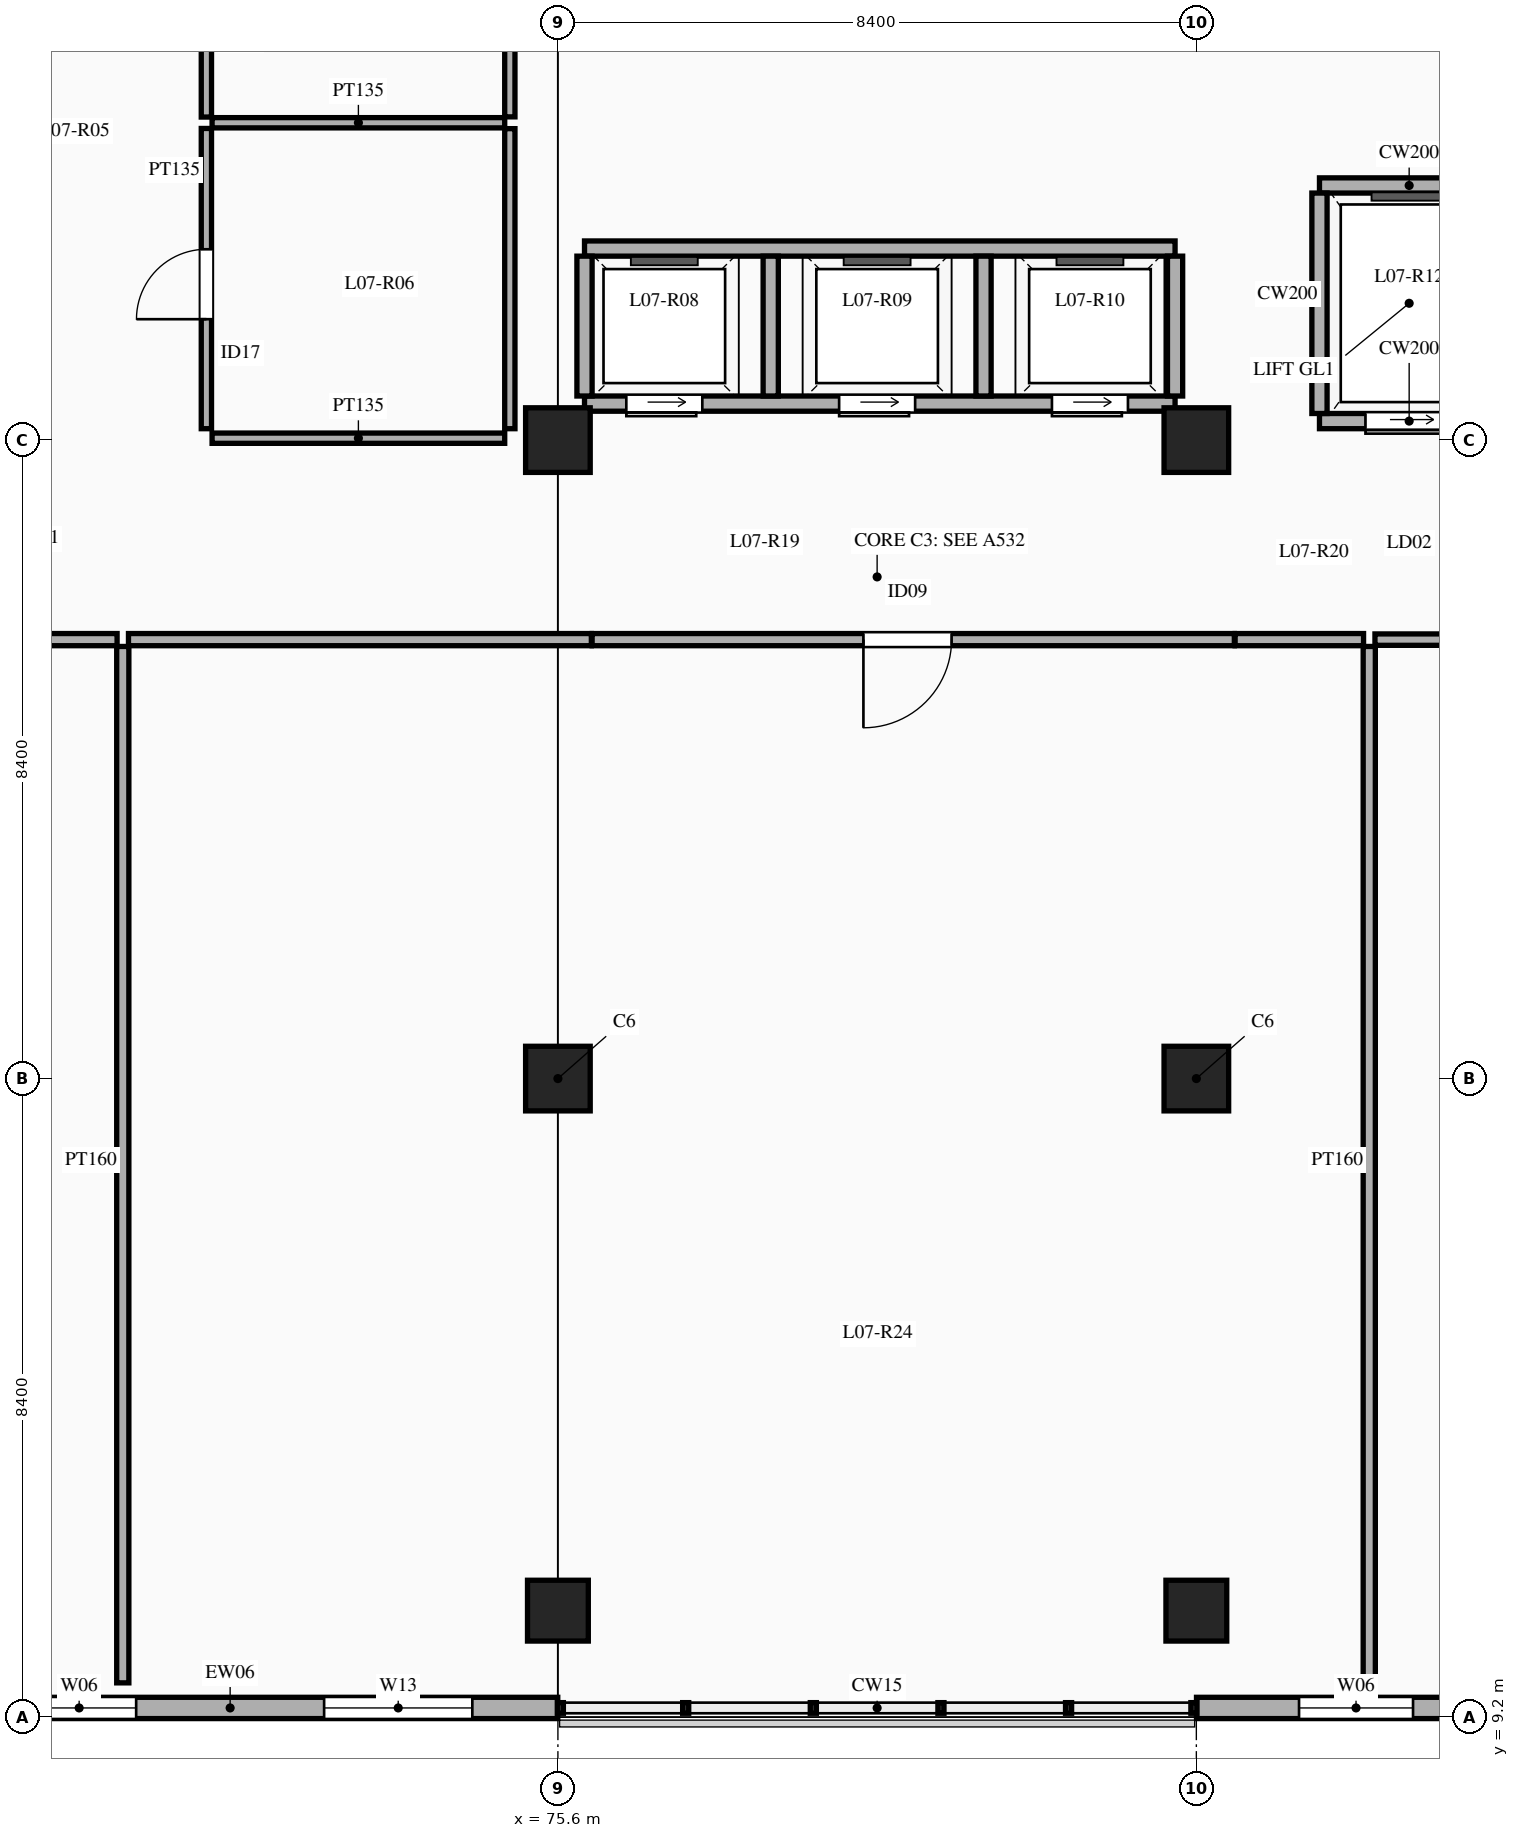
"""IFC4 building model, lengths in metres.
Left out: names, types, materials, properties, quantities, classifications, styles, units other than length and angle.
Written with IfcOpenShell. Run it as: python <this file> out.ifc"""

import sys

from ifc_helpers import new_model, si_unit, direction, frame, frame_2d, origin, origin_2d, place, context, subcontext, project, spatial, rectangle, extrude, element, fill, save


model = new_model("IFC4")
c1 = context("Model", 3, precision=1e-05, world=origin(), true_north=direction((0.0, 1.0)))
c2 = subcontext(c1, "Body", "Model", "MODEL_VIEW")
j1 = project(units=[si_unit("LENGTHUNIT", "METRE"), si_unit("PLANEANGLEUNIT", "RADIAN")], contexts=[c1])
p1 = place(None, origin())
s1 = spatial("IfcSite", under=j1, at=p1, CompositionType="ELEMENT")
p2 = place(p1, origin())
s2 = spatial("IfcBuilding", under=s1, at=p2, CompositionType="ELEMENT")
p3 = place(p2, frame((0.0, 0.0, 33.0)))
s3 = spatial("IfcBuildingStorey", under=s2, at=p3, CompositionType="ELEMENT", Elevation=33.0)
p4 = place(p3, frame((75.6, 10.6, 0.0), z_axis=(0.0, 0.0, 1.0), x_axis=(1.0, 0.0, 0.0)))
e1 = element("IfcColumn", 1, at=p4, inside=s3, PredefinedType="COLUMN", context=c2, shape_type="SweptSolid", body=[
    extrude(rectangle(XDim=0.8, YDim=0.8, at=origin_2d()), origin(), (0.0, 0.0, 1.0), 4.5),
])
for number, where, z_axis, x_axis in (
    (2, (75.6, 17.6, 0.0), (0.0, 0.0, 1.0), (1.0, 0.0, 0.0)),
    (3, (75.6, 26.0, 0.0), (0.0, 0.0, 1.0), (1.0, 0.0, 0.0)),
):
    element("IfcColumn", number, at=place(p3, frame(where, z_axis=z_axis, x_axis=x_axis)), inside=s3, PredefinedType="COLUMN", context=c2, shape_type="SweptSolid", body=[
        extrude(rectangle(XDim=0.85, YDim=0.85, at=origin_2d()), origin(), (0.0, 0.0, 1.0), 4.5),
    ])
p5 = place(p3, frame((84.0, 10.6, 0.0), z_axis=(0.0, 0.0, 1.0), x_axis=(1.0, 0.0, 0.0)))
e4 = element("IfcColumn", 4, at=p5, inside=s3, PredefinedType="COLUMN", context=c2, shape_type="SweptSolid", body=[
    extrude(rectangle(XDim=0.8, YDim=0.8, at=origin_2d()), origin(), (0.0, 0.0, 1.0), 4.5),
])
for number, where, z_axis, x_axis in (
    (5, (84.0, 17.6, 0.0), (0.0, 0.0, 1.0), (1.0, 0.0, 0.0)),
    (6, (84.0, 26.0, 0.0), (0.0, 0.0, 1.0), (1.0, 0.0, 0.0)),
):
    element("IfcColumn", number, at=place(p3, frame(where, z_axis=z_axis, x_axis=x_axis)), inside=s3, PredefinedType="COLUMN", context=c2, shape_type="SweptSolid", body=[
        extrude(rectangle(XDim=0.85, YDim=0.85, at=origin_2d()), origin(), (0.0, 0.0, 1.0), 4.5),
    ])
p6 = place(p3, frame((67.202, 9.32, 0.0), z_axis=(0.0, 0.0, 1.0), x_axis=(1.0, 0.0, 0.0)))
e7 = element("IfcWall", 7, at=p6, inside=s3, PredefinedType="ELEMENTEDWALL", context=c2, shape_type="SweptSolid", body=[
    extrude(rectangle(XDim=8.396, YDim=0.28, at=frame_2d((4.198, 0.0))), origin(), (0.0, 0.0, 1.0), 3.55),
])
p7 = place(p6, frame((1.349, 0.0, 0.9)))
e8 = element("IfcOpeningElement", 8, at=p7, cuts=e7, PredefinedType="OPENING", context=c2, shape_type="SweptSolid", body=[
    extrude(rectangle(XDim=1.5, YDim=2.0, at=frame_2d((0.75, 1.0))), frame((0.0, 0.15, 0.0), z_axis=(0.0, -1.0, 0.0), x_axis=(1.0, 0.0, 0.0)), (0.0, 0.0, 1.0), 0.3),
])
p8 = place(p6, frame((5.322, 0.0, 0.9)))
e9 = element("IfcOpeningElement", 9, at=p8, cuts=e7, PredefinedType="OPENING", context=c2, shape_type="SweptSolid", body=[
    extrude(rectangle(XDim=1.95, YDim=2.0, at=frame_2d((0.975, 1.0))), frame((0.0, 0.15, 0.0), z_axis=(0.0, -1.0, 0.0), x_axis=(1.0, 0.0, 0.0)), (0.0, 0.0, 1.0), 0.3),
])
p9 = place(p3, frame((84.002, 9.32, 0.0), z_axis=(0.0, 0.0, 1.0), x_axis=(1.0, 0.0, 0.0)))
e10 = element("IfcWall", 10, at=p9, inside=s3, PredefinedType="ELEMENTEDWALL", context=c2, shape_type="SweptSolid", body=[
    extrude(rectangle(XDim=8.396, YDim=0.28, at=frame_2d((4.198, 0.0))), origin(), (0.0, 0.0, 1.0), 3.55),
])
p10 = place(p9, frame((1.349, 0.0, 0.9)))
e11 = element("IfcOpeningElement", 11, at=p10, cuts=e10, PredefinedType="OPENING", context=c2, shape_type="SweptSolid", body=[
    extrude(rectangle(XDim=1.5, YDim=2.0, at=frame_2d((0.75, 1.0))), frame((0.0, 0.15, 0.0), z_axis=(0.0, -1.0, 0.0), x_axis=(1.0, 0.0, 0.0)), (0.0, 0.0, 1.0), 0.3),
])
p11 = place(p9, frame((5.322, 0.0, 0.9)))
e12 = element("IfcOpeningElement", 12, at=p11, cuts=e10, PredefinedType="OPENING", context=c2, shape_type="SweptSolid", body=[
    extrude(rectangle(XDim=1.95, YDim=2.0, at=frame_2d((0.975, 1.0))), frame((0.0, 0.15, 0.0), z_axis=(0.0, -1.0, 0.0), x_axis=(1.0, 0.0, 0.0)), (0.0, 0.0, 1.0), 0.3),
])
p12 = place(p3, frame((75.95, 26.48, 0.0), z_axis=(0.0, 0.0, 1.0), x_axis=(1.0, 0.0, 0.0)))
e13 = element("IfcWall", 13, at=p12, inside=s3, PredefinedType="SOLIDWALL", context=c2, shape_type="SweptSolid", body=[
    extrude(rectangle(XDim=7.77, YDim=0.2, at=frame_2d((3.885, 0.0))), origin(), (0.0, 0.0, 1.0), 4.3),
])
p13 = place(p12, frame((0.55, 0.0, 0.0)))
e14 = element("IfcOpeningElement", 14, at=p13, cuts=e13, PredefinedType="OPENING", context=c2, shape_type="SweptSolid", body=[
    extrude(rectangle(XDim=1.0, YDim=2.15, at=frame_2d((0.5, 1.075))), frame((0.0, 0.11, 0.0), z_axis=(0.0, -1.0, 0.0), x_axis=(1.0, 0.0, 0.0)), (0.0, 0.0, 1.0), 0.22),
])
p14 = place(p12, frame((3.35, 0.0, 0.0)))
e15 = element("IfcOpeningElement", 15, at=p14, cuts=e13, PredefinedType="OPENING", context=c2, shape_type="SweptSolid", body=[
    extrude(rectangle(XDim=1.0, YDim=2.15, at=frame_2d((0.5, 1.075))), frame((0.0, 0.11, 0.0), z_axis=(0.0, -1.0, 0.0), x_axis=(1.0, 0.0, 0.0)), (0.0, 0.0, 1.0), 0.22),
])
p15 = place(p12, frame((6.15, 0.0, 0.0)))
e16 = element("IfcOpeningElement", 16, at=p15, cuts=e13, PredefinedType="OPENING", context=c2, shape_type="SweptSolid", body=[
    extrude(rectangle(XDim=1.0, YDim=2.15, at=frame_2d((0.5, 1.075))), frame((0.0, 0.11, 0.0), z_axis=(0.0, -1.0, 0.0), x_axis=(1.0, 0.0, 0.0)), (0.0, 0.0, 1.0), 0.22),
])
p16 = place(p3, frame((75.95, 28.52, 0.0), z_axis=(0.0, 0.0, 1.0), x_axis=(1.0, 0.0, 0.0)))
e17 = element("IfcWall", 17, at=p16, inside=s3, PredefinedType="SOLIDWALL", context=c2, shape_type="SweptSolid", body=[
    extrude(rectangle(XDim=7.77, YDim=0.2, at=frame_2d((3.885, 0.0))), origin(), (0.0, 0.0, 1.0), 4.3),
])
for number, where, z_axis, x_axis in (
    (18, (75.95, 26.58, 0.0), (0.0, 0.0, 1.0), (0.0, 1.0, 0.0)),
    (19, (78.4, 26.58, 0.0), (0.0, 0.0, 1.0), (0.0, 1.0, 0.0)),
    (20, (81.2, 26.58, 0.0), (0.0, 0.0, 1.0), (0.0, 1.0, 0.0)),
):
    element("IfcWall", number, at=place(p3, frame(where, z_axis=z_axis, x_axis=x_axis)), inside=s3, PredefinedType="SOLIDWALL", context=c2, shape_type="SweptSolid", body=[
        extrude(rectangle(XDim=1.84, YDim=0.2, at=frame_2d((0.92, 0.0))), origin(), (0.0, 0.0, 1.0), 4.3),
    ])
p17 = place(p3, frame((83.72, 26.58, 0.0), z_axis=(0.0, 0.0, 1.0), x_axis=(0.0, 1.0, 0.0)))
e21 = element("IfcWall", 21, at=p17, inside=s3, PredefinedType="SOLIDWALL", context=c2, shape_type="SweptSolid", body=[
    extrude(rectangle(XDim=1.84, YDim=0.2, at=frame_2d((0.92, 0.0))), origin(), (0.0, 0.0, 1.0), 3.78),
])
p18 = place(p3, frame((85.62, 26.25, 0.0), z_axis=(0.0, 0.0, 1.0), x_axis=(1.0, 0.0, 0.0)))
e22 = element("IfcWall", 22, at=p18, inside=s3, PredefinedType="SOLIDWALL", context=c2, shape_type="SweptSolid", body=[
    extrude(rectangle(XDim=2.36, YDim=0.2, at=frame_2d((1.18, 0.0))), origin(), (0.0, 0.0, 1.0), 3.73),
])
p19 = place(p18, frame((0.605, 0.0, 0.0)))
e23 = element("IfcOpeningElement", 23, at=p19, cuts=e22, PredefinedType="OPENING", context=c2, shape_type="SweptSolid", body=[
    extrude(rectangle(XDim=1.15, YDim=2.2, at=frame_2d((0.575, 1.1))), frame((0.0, 0.11, 0.0), z_axis=(0.0, -1.0, 0.0), x_axis=(1.0, 0.0, 0.0)), (0.0, 0.0, 1.0), 0.22),
])
p20 = place(p3, frame((85.62, 29.35, 0.0), z_axis=(0.0, 0.0, 1.0), x_axis=(1.0, 0.0, 0.0)))
e24 = element("IfcWall", 24, at=p20, inside=s3, PredefinedType="SOLIDWALL", context=c2, shape_type="SweptSolid", body=[
    extrude(rectangle(XDim=2.36, YDim=0.2, at=frame_2d((1.18, 0.0))), origin(), (0.0, 0.0, 1.0), 4.3),
])
p21 = place(p3, frame((85.62, 26.35, 0.0), z_axis=(0.0, 0.0, 1.0), x_axis=(0.0, 1.0, 0.0)))
e25 = element("IfcWall", 25, at=p21, inside=s3, PredefinedType="SOLIDWALL", context=c2, shape_type="SweptSolid", body=[
    extrude(rectangle(XDim=2.9, YDim=0.2, at=frame_2d((1.45, 0.0))), origin(), (0.0, 0.0, 1.0), 4.3),
])
p22 = place(p3, frame((70.975, 26.15, 0.0), z_axis=(0.0, 0.0, 1.0), x_axis=(0.0, 1.0, 0.0)))
e26 = element("IfcWall", 26, at=p22, inside=s3, PredefinedType="PARTITIONING", context=c2, shape_type="SweptSolid", body=[
    extrude(rectangle(XDim=3.95, YDim=0.135, at=frame_2d((1.975, 0.0))), origin(), (0.0, 0.0, 1.0), 3.45),
])
p23 = place(p22, frame((1.441, 0.0, 0.0)))
e27 = element("IfcOpeningElement", 27, at=p23, cuts=e26, PredefinedType="OPENING", context=c2, shape_type="SweptSolid", body=[
    extrude(rectangle(XDim=0.92, YDim=2.12, at=frame_2d((0.46, 1.06))), frame((0.0, 0.077, 0.0), z_axis=(0.0, -1.0, 0.0), x_axis=(1.0, 0.0, 0.0)), (0.0, 0.0, 1.0), 0.155),
])
p24 = place(p3, frame((70.975, 30.25, 0.0), z_axis=(0.0, 0.0, 1.0), x_axis=(0.0, 1.0, 0.0)))
e28 = element("IfcWall", 28, at=p24, inside=s3, PredefinedType="PARTITIONING", context=c2, shape_type="SweptSolid", body=[
    extrude(rectangle(XDim=3.9, YDim=0.135, at=frame_2d((1.95, 0.0))), origin(), (0.0, 0.0, 1.0), 3.45),
])
p25 = place(p24, frame((1.46, 0.0, 0.0)))
e29 = element("IfcOpeningElement", 29, at=p25, cuts=e28, PredefinedType="OPENING", context=c2, shape_type="SweptSolid", body=[
    extrude(rectangle(XDim=0.98, YDim=2.15, at=frame_2d((0.49, 1.075))), frame((0.0, 0.077, 0.0), z_axis=(0.0, -1.0, 0.0), x_axis=(1.0, 0.0, 0.0)), (0.0, 0.0, 1.0), 0.155),
])
for number, where, z_axis, x_axis in (
    (30, (71.05, 30.175, 0.0), (0.0, 0.0, 1.0), (1.0, 0.0, 0.0)),
    (31, (71.05, 26.025, 0.0), (0.0, 0.0, 1.0), (1.0, 0.0, 0.0)),
):
    element("IfcWall", number, at=place(p3, frame(where, z_axis=z_axis, x_axis=x_axis)), inside=s3, PredefinedType="PARTITIONING", context=c2, shape_type="SweptSolid", body=[
        extrude(rectangle(XDim=3.85, YDim=0.135, at=frame_2d((1.925, 0.0))), origin(), (0.0, 0.0, 1.0), 3.45),
    ])
p26 = place(p3, frame((76.05, 23.375, 0.0), z_axis=(0.0, 0.0, 1.0), x_axis=(1.0, 0.0, 0.0)))
e32 = element("IfcWall", 32, at=p26, inside=s3, PredefinedType="PARTITIONING", context=c2, shape_type="SweptSolid", body=[
    extrude(rectangle(XDim=8.45, YDim=0.16, at=frame_2d((4.225, 0.0))), origin(), (0.0, 0.0, 1.0), 3.45),
])
p27 = place(p26, frame((3.57, 0.0, 0.0)))
e33 = element("IfcOpeningElement", 33, at=p27, cuts=e32, PredefinedType="OPENING", context=c2, shape_type="SweptSolid", body=[
    extrude(rectangle(XDim=1.16, YDim=2.2, at=frame_2d((0.58, 1.1))), frame((0.0, 0.09, 0.0), z_axis=(0.0, -1.0, 0.0), x_axis=(1.0, 0.0, 0.0)), (0.0, 0.0, 1.0), 0.18),
])
p28 = place(p3, frame((84.51, 23.375, 0.0), z_axis=(0.0, 0.0, 1.0), x_axis=(1.0, 0.0, 0.0)))
e34 = element("IfcWall", 34, at=p28, inside=s3, PredefinedType="PARTITIONING", context=c2, shape_type="SweptSolid", body=[
    extrude(rectangle(XDim=1.69, YDim=0.16, at=frame_2d((0.845, 0.0))), origin(), (0.0, 0.0, 1.0), 3.45),
])
p29 = place(p3, frame((86.35, 23.375, 0.0), z_axis=(0.0, 0.0, 1.0), x_axis=(1.0, 0.0, 0.0)))
e35 = element("IfcWall", 35, at=p29, inside=s3, PredefinedType="PARTITIONING", context=c2, shape_type="SweptSolid", body=[
    extrude(rectangle(XDim=2.05, YDim=0.15, at=frame_2d((1.025, 0.0))), origin(), (0.0, 0.0, 1.0), 3.45),
])
p30 = place(p3, frame((50.85, 23.375, 0.0), z_axis=(0.0, 0.0, 1.0), x_axis=(1.0, 0.0, 0.0)))
e36 = element("IfcWall", 36, at=p30, inside=s3, PredefinedType="PARTITIONING", context=c2, shape_type="SweptSolid", body=[
    extrude(rectangle(XDim=18.95, YDim=0.16, at=frame_2d((9.475, 0.0))), origin(), (0.0, 0.0, 1.0), 3.45),
])
p31 = place(p30, frame((9.994, 0.0, 0.0)))
e37 = element("IfcOpeningElement", 37, at=p31, cuts=e36, PredefinedType="OPENING", context=c2, shape_type="SweptSolid", body=[
    extrude(rectangle(XDim=1.06, YDim=2.18, at=frame_2d((0.53, 1.09))), frame((0.0, 0.09, 0.0), z_axis=(0.0, -1.0, 0.0), x_axis=(1.0, 0.0, 0.0)), (0.0, 0.0, 1.0), 0.18),
])
p32 = place(p3, frame((69.95, 23.375, 0.0), z_axis=(0.0, 0.0, 1.0), x_axis=(1.0, 0.0, 0.0)))
e38 = element("IfcWall", 38, at=p32, inside=s3, PredefinedType="PARTITIONING", context=c2, shape_type="SweptSolid", body=[
    extrude(rectangle(XDim=6.09, YDim=0.16, at=frame_2d((3.045, 0.0))), origin(), (0.0, 0.0, 1.0), 3.45),
])
for number, where, z_axis, x_axis in (
    (39, (69.875, 9.65, 0.0), (0.0, 0.0, 1.0), (0.0, 1.0, 0.0)),
    (40, (86.275, 9.65, 0.0), (0.0, 0.0, 1.0), (0.0, 1.0, 0.0)),
):
    element("IfcWall", number, at=place(p3, frame(where, z_axis=z_axis, x_axis=x_axis)), inside=s3, PredefinedType="PARTITIONING", context=c2, shape_type="SweptSolid", body=[
        extrude(rectangle(XDim=13.635, YDim=0.16, at=frame_2d((6.817, 0.0))), origin(), (0.0, 0.0, 1.0), 3.45),
    ])
p33 = place(p3, frame((74.968, 26.15, 0.0), z_axis=(0.0, 0.0, 1.0), x_axis=(0.0, 1.0, 0.0)))
e41 = element("IfcWall", 41, at=p33, inside=s3, PredefinedType="PARTITIONING", context=c2, shape_type="SweptSolid", body=[
    extrude(rectangle(XDim=3.948, YDim=0.135, at=frame_2d((1.974, 0.0))), origin(), (0.0, 0.0, 1.0), 3.45),
])
p34 = place(p3, frame((74.968, 30.252, 0.0), z_axis=(0.0, 0.0, 1.0), x_axis=(0.0, 1.0, 0.0)))
e42 = element("IfcWall", 42, at=p34, inside=s3, PredefinedType="PARTITIONING", context=c2, shape_type="SweptSolid", body=[
    extrude(rectangle(XDim=3.895, YDim=0.135, at=frame_2d((1.948, 0.0))), origin(), (0.0, 0.0, 1.0), 3.45),
])
p35 = place(p7, origin())
e43 = element("IfcWindow", 43, at=p35, inside=s3, PartitioningType="DOUBLE_PANEL_VERTICAL", PredefinedType="WINDOW", context=c2, shape_type="SweptSolid", body=[
    extrude(rectangle(XDim=1.5, YDim=2.0, at=frame_2d((0.75, 1.0))), frame((0.0, 0.03, 0.0), z_axis=(0.0, -1.0, 0.0), x_axis=(1.0, 0.0, 0.0)), (0.0, 0.0, 1.0), 0.06),
])
fill(e8, e43)
p36 = place(p8, origin())
e44 = element("IfcWindow", 44, at=p36, inside=s3, PartitioningType="TRIPLE_PANEL_VERTICAL", PredefinedType="WINDOW", context=c2, shape_type="SweptSolid", body=[
    extrude(rectangle(XDim=1.95, YDim=2.0, at=frame_2d((0.975, 1.0))), frame((0.0, 0.03, 0.0), z_axis=(0.0, -1.0, 0.0), x_axis=(1.0, 0.0, 0.0)), (0.0, 0.0, 1.0), 0.06),
])
fill(e9, e44)
p37 = place(p10, origin())
e45 = element("IfcWindow", 45, at=p37, inside=s3, PartitioningType="DOUBLE_PANEL_VERTICAL", PredefinedType="WINDOW", context=c2, shape_type="SweptSolid", body=[
    extrude(rectangle(XDim=1.5, YDim=2.0, at=frame_2d((0.75, 1.0))), frame((0.0, 0.03, 0.0), z_axis=(0.0, -1.0, 0.0), x_axis=(1.0, 0.0, 0.0)), (0.0, 0.0, 1.0), 0.06),
])
fill(e11, e45)
p38 = place(p13, frame((1.0, 0.0, 0.0), z_axis=(0.0, 0.0, 1.0), x_axis=(-1.0, 0.0, 0.0)))
e46 = element("IfcDoor", 46, at=p38, inside=s3, OperationType="SLIDING_TO_LEFT", PredefinedType="DOOR", context=c2, shape_type="SweptSolid", body=[
    extrude(rectangle(XDim=1.0, YDim=2.15, at=frame_2d((0.5, 1.075))), frame((0.0, 0.025, 0.0), z_axis=(0.0, -1.0, 0.0), x_axis=(1.0, 0.0, 0.0)), (0.0, 0.0, 1.0), 0.05),
])
fill(e14, e46)
p39 = place(p14, frame((1.0, 0.0, 0.0), z_axis=(0.0, 0.0, 1.0), x_axis=(-1.0, 0.0, 0.0)))
e47 = element("IfcDoor", 47, at=p39, inside=s3, OperationType="SLIDING_TO_LEFT", PredefinedType="DOOR", context=c2, shape_type="SweptSolid", body=[
    extrude(rectangle(XDim=1.0, YDim=2.15, at=frame_2d((0.5, 1.075))), frame((0.0, 0.025, 0.0), z_axis=(0.0, -1.0, 0.0), x_axis=(1.0, 0.0, 0.0)), (0.0, 0.0, 1.0), 0.05),
])
fill(e15, e47)
p40 = place(p15, frame((1.0, 0.0, 0.0), z_axis=(0.0, 0.0, 1.0), x_axis=(-1.0, 0.0, 0.0)))
e48 = element("IfcDoor", 48, at=p40, inside=s3, OperationType="SLIDING_TO_LEFT", PredefinedType="DOOR", context=c2, shape_type="SweptSolid", body=[
    extrude(rectangle(XDim=1.0, YDim=2.15, at=frame_2d((0.5, 1.075))), frame((0.0, 0.025, 0.0), z_axis=(0.0, -1.0, 0.0), x_axis=(1.0, 0.0, 0.0)), (0.0, 0.0, 1.0), 0.05),
])
fill(e16, e48)
p41 = place(p19, frame((1.15, 0.0, 0.0), z_axis=(0.0, 0.0, 1.0), x_axis=(-1.0, 0.0, 0.0)))
e49 = element("IfcDoor", 49, at=p41, inside=s3, OperationType="SLIDING_TO_LEFT", PredefinedType="DOOR", context=c2, shape_type="SweptSolid", body=[
    extrude(rectangle(XDim=1.15, YDim=2.2, at=frame_2d((0.575, 1.1))), frame((0.0, 0.025, 0.0), z_axis=(0.0, -1.0, 0.0), x_axis=(1.0, 0.0, 0.0)), (0.0, 0.0, 1.0), 0.05),
])
fill(e23, e49)
p42 = place(p23, origin())
e50 = element("IfcDoor", 50, at=p42, inside=s3, OperationType="SINGLE_SWING_LEFT", PredefinedType="DOOR", context=c2, shape_type="SweptSolid", body=[
    extrude(rectangle(XDim=0.92, YDim=2.12, at=frame_2d((0.46, 1.06))), frame((0.0, 0.025, 0.0), z_axis=(0.0, -1.0, 0.0), x_axis=(1.0, 0.0, 0.0)), (0.0, 0.0, 1.0), 0.05),
])
fill(e27, e50)
p43 = place(p27, frame((1.16, 0.0, 0.0), z_axis=(0.0, 0.0, 1.0), x_axis=(-1.0, 0.0, 0.0)))
e51 = element("IfcDoor", 51, at=p43, inside=s3, OperationType="SINGLE_SWING_RIGHT", PredefinedType="DOOR", context=c2, shape_type="SweptSolid", body=[
    extrude(rectangle(XDim=1.16, YDim=2.2, at=frame_2d((0.58, 1.1))), frame((0.0, 0.025, 0.0), z_axis=(0.0, -1.0, 0.0), x_axis=(1.0, 0.0, 0.0)), (0.0, 0.0, 1.0), 0.05),
])
fill(e33, e51)
save(model, sys.argv[1])
